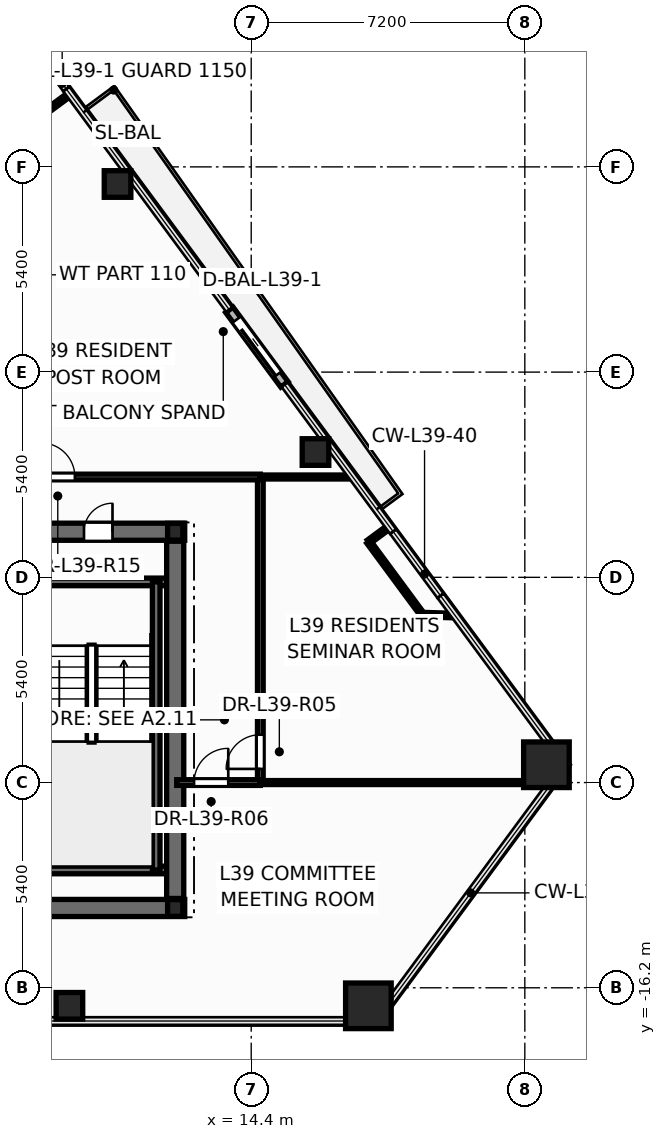
"""IFC4 building model, lengths in metres.
Left out: names, types, materials, properties, quantities, classifications, styles, units other than length and angle.
Written with IfcOpenShell. Run it as: python <this file> out.ifc"""

import sys

from ifc_helpers import new_model, si_unit, direction, frame, frame_2d, origin, origin_2d, place, context, subcontext, project, spatial, rectangle, hollow_rectangle, hollow_circle, i_section, extrude, element, fill, save


model = new_model("IFC4")
c1 = context("Model", 3, precision=1e-05, world=origin(), true_north=direction((0.0, 1.0)))
c2 = subcontext(c1, "Body", "Model", "MODEL_VIEW")
j1 = project(units=[si_unit("LENGTHUNIT", "METRE"), si_unit("PLANEANGLEUNIT", "RADIAN")], contexts=[c1])
p1 = place(None, origin())
s1 = spatial("IfcSite", under=j1, at=p1, CompositionType="ELEMENT")
p2 = place(p1, origin())
s2 = spatial("IfcBuilding", under=s1, at=p2, CompositionType="ELEMENT")
p3 = place(p2, frame((0.0, 0.0, 150.9)))
s3 = spatial("IfcBuildingStorey", under=s2, at=p3, CompositionType="ELEMENT", Elevation=150.9)
for number, where, z_axis, x_axis in (
    (1, (17.484, -16.674, 0.0), (0.0, 0.0, 1.0), (1.0, 0.0, 0.0)),
    (2, (22.168, -10.331, 0.0), (0.0, 0.0, 1.0), (1.0, 0.0, 0.0)),
):
    element("IfcColumn", number, at=place(p3, frame(where, z_axis=z_axis, x_axis=x_axis)), inside=s3, PredefinedType="COLUMN", context=c2, shape_type="SweptSolid", body=[
        extrude(hollow_rectangle(XDim=1.2, YDim=1.2, WallThickness=0.055, at=origin_2d()), origin(), (0.0, 0.0, 1.0), 3.6),
    ])
for number, where, z_axis, x_axis in (
    (3, (9.616, -16.674, 0.0), (0.0, 0.0, 1.0), (1.0, 0.0, 0.0)),
    (4, (16.092, -2.103, 0.0), (0.0, 0.0, 1.0), (1.0, 0.0, 0.0)),
    (5, (10.883, 4.95, 0.0), (0.0, 0.0, 1.0), (1.0, 0.0, 0.0)),
):
    element("IfcColumn", number, at=place(p3, frame(where, z_axis=z_axis, x_axis=x_axis)), inside=s3, PredefinedType="COLUMN", context=c2, shape_type="SweptSolid", body=[
        extrude(hollow_circle(Radius=0.35, WallThickness=0.03, at=origin_2d()), origin(), (0.0, 0.0, 1.0), 3.6),
    ])
for number, where, z_axis, x_axis in (
    (6, (12.4, -14.1, 0.0), (0.0, 0.0, 1.0), (1.0, 0.0, 0.0)),
    (7, (12.4, -4.2, 0.0), (0.0, 0.0, 1.0), (1.0, 0.0, 0.0)),
):
    element("IfcColumn", number, at=place(p3, frame(where, z_axis=z_axis, x_axis=x_axis)), inside=s3, PredefinedType="COLUMN", context=c2, shape_type="SweptSolid", body=[
        extrude(i_section(OverallWidth=0.4, OverallDepth=0.44, WebThickness=0.028, FlangeThickness=0.04, at=origin_2d()), origin(), (0.0, 0.0, 1.0), 3.6),
    ])
p4 = place(p3, frame((15.275, -0.324, -0.015), z_axis=(0.0, 0.0, 1.0), x_axis=(-0.594092829232, 0.804396488216, 0.0)))
e8 = element("IfcWall", 8, at=p4, inside=s3, PredefinedType="STANDARD", context=c2, shape_type="SweptSolid", body=[
    extrude(rectangle(XDim=2.44, YDim=0.24, at=frame_2d((1.22, 0.0))), origin(), (0.0, 0.0, 1.0), 2.807),
])
p5 = place(p4, frame((0.32, 0.0, 0.015)))
e9 = element("IfcOpeningElement", 9, at=p5, cuts=e8, PredefinedType="OPENING", context=c2, shape_type="SweptSolid", body=[
    extrude(rectangle(XDim=1.806, YDim=2.204, at=frame_2d((0.9, 1.102))), frame((0.0, 0.13, 0.0), z_axis=(0.0, -1.0, 0.0), x_axis=(1.0, 0.0, 0.0)), (0.0, 0.0, 1.0), 0.26),
])
p6 = place(p3, frame((-12.65, -14.1, 0.0), z_axis=(0.0, 0.0, 1.0), x_axis=(1.0, 0.0, 0.0)))
e10 = element("IfcWall", 10, at=p6, inside=s3, PredefinedType="SHEAR", context=c2, shape_type="SweptSolid", body=[
    extrude(rectangle(XDim=25.3, YDim=0.45, at=frame_2d((12.65, 0.0))), origin(), (0.0, 0.0, 1.0), 3.6),
])
p7 = place(p3, frame((-12.65, -4.2, 0.0), z_axis=(0.0, 0.0, 1.0), x_axis=(1.0, 0.0, 0.0)))
e11 = element("IfcWall", 11, at=p7, inside=s3, PredefinedType="SHEAR", context=c2, shape_type="SweptSolid", body=[
    extrude(rectangle(XDim=25.3, YDim=0.45, at=frame_2d((12.65, 0.0))), origin(), (0.0, 0.0, 1.0), 3.6),
])
p8 = place(p7, frame((1.85, 0.0, 0.0)))
e12 = element("IfcOpeningElement", 12, at=p8, cuts=e11, PredefinedType="OPENING", context=c2, shape_type="SweptSolid", body=[
    extrude(rectangle(XDim=0.756, YDim=2.054, at=frame_2d((0.375, 1.027))), frame((0.0, 0.235, 0.0), z_axis=(0.0, -1.0, 0.0), x_axis=(1.0, 0.0, 0.0)), (0.0, 0.0, 1.0), 0.47),
])
p9 = place(p7, frame((22.65, 0.0, 0.0)))
e13 = element("IfcOpeningElement", 13, at=p9, cuts=e11, PredefinedType="OPENING", context=c2, shape_type="SweptSolid", body=[
    extrude(rectangle(XDim=0.756, YDim=2.054, at=frame_2d((0.375, 1.027))), frame((0.0, 0.235, 0.0), z_axis=(0.0, -1.0, 0.0), x_axis=(1.0, 0.0, 0.0)), (0.0, 0.0, 1.0), 0.47),
])
p10 = place(p7, frame((5.85, 0.0, 0.0)))
e14 = element("IfcOpeningElement", 14, at=p10, cuts=e11, PredefinedType="OPENING", context=c2, shape_type="SweptSolid", body=[
    extrude(rectangle(XDim=1.006, YDim=2.104, at=frame_2d((0.5, 1.052))), frame((0.0, 0.235, 0.0), z_axis=(0.0, -1.0, 0.0), x_axis=(1.0, 0.0, 0.0)), (0.0, 0.0, 1.0), 0.47),
])
p11 = place(p7, frame((10.35, 0.0, 0.0)))
e15 = element("IfcOpeningElement", 15, at=p11, cuts=e11, PredefinedType="OPENING", context=c2, shape_type="SweptSolid", body=[
    extrude(rectangle(XDim=1.406, YDim=2.154, at=frame_2d((0.7, 1.077))), frame((0.0, 0.235, 0.0), z_axis=(0.0, -1.0, 0.0), x_axis=(1.0, 0.0, 0.0)), (0.0, 0.0, 1.0), 0.47),
])
p12 = place(p7, frame((18.45, 0.0, 0.0)))
e16 = element("IfcOpeningElement", 16, at=p12, cuts=e11, PredefinedType="OPENING", context=c2, shape_type="SweptSolid", body=[
    extrude(rectangle(XDim=1.006, YDim=2.104, at=frame_2d((0.5, 1.052))), frame((0.0, 0.235, 0.0), z_axis=(0.0, -1.0, 0.0), x_axis=(1.0, 0.0, 0.0)), (0.0, 0.0, 1.0), 0.47),
])
for number, where, z_axis, x_axis in (
    (17, (8.48, -5.52, 0.0), (0.0, 0.0, 1.0), (1.0, 0.0, 0.0)),
    (18, (8.48, -13.1, 0.0), (0.0, 0.0, 1.0), (1.0, 0.0, 0.0)),
):
    element("IfcWall", number, at=place(p3, frame(where, z_axis=z_axis, x_axis=x_axis)), inside=s3, PredefinedType="SOLIDWALL", context=c2, shape_type="SweptSolid", body=[
        extrude(rectangle(XDim=3.87, YDim=0.2, at=frame_2d((1.935, 0.0))), origin(), (0.0, 0.0, 1.0), 3.6),
    ])
p13 = place(p3, frame((11.9, -13.1, 0.0), z_axis=(0.0, 0.0, 1.0), x_axis=(0.0, 1.0, 0.0)))
e19 = element("IfcWall", 19, at=p13, inside=s3, PredefinedType="SOLIDWALL", context=c2, shape_type="SweptSolid", body=[
    extrude(rectangle(XDim=7.58, YDim=0.2, at=frame_2d((3.79, 0.0))), origin(), (0.0, 0.0, 1.0), 3.6),
])
p14 = place(p3, frame((12.4, -13.85, 0.0), z_axis=(0.0, 0.0, 1.0), x_axis=(0.0, 1.0, 0.0)))
e20 = element("IfcWall", 20, at=p14, inside=s3, PredefinedType="SHEAR", context=c2, shape_type="SweptSolid", body=[
    extrude(rectangle(XDim=9.4, YDim=0.45, at=frame_2d((4.7, 0.0))), origin(), (0.0, 0.0, 1.0), 3.6),
])
p15 = place(p3, frame((14.64, -10.8, 0.0), z_axis=(0.0, 0.0, 1.0), x_axis=(0.0, 1.0, 0.0)))
e21 = element("IfcWall", 21, at=p15, inside=s3, PredefinedType="PARTITIONING", context=c2, shape_type="SweptSolid", body=[
    extrude(rectangle(XDim=8.04, YDim=0.15, at=frame_2d((4.02, 0.0))), origin(), (0.0, 0.0, 1.0), 2.325),
])
p16 = place(p15, frame((0.359, 0.0, 0.0)))
e22 = element("IfcOpeningElement", 22, at=p16, cuts=e21, PredefinedType="OPENING", context=c2, shape_type="SweptSolid", body=[
    extrude(rectangle(XDim=0.906, YDim=2.104, at=frame_2d((0.45, 1.052))), frame((0.0, 0.085, 0.0), z_axis=(0.0, -1.0, 0.0), x_axis=(1.0, 0.0, 0.0)), (0.0, 0.0, 1.0), 0.17),
])
p17 = place(p3, frame((14.64, -10.8, 0.0), z_axis=(0.0, 0.0, 1.0), x_axis=(1.0, 0.0, 0.0)))
e23 = element("IfcWall", 23, at=p17, inside=s3, PredefinedType="PARTITIONING", context=c2, shape_type="SweptSolid", body=[
    extrude(rectangle(XDim=7.679, YDim=0.105, at=frame_2d((3.84, 0.0))), origin(), (0.0, 0.0, 1.0), 2.792),
])
p18 = place(p3, frame((8.602, -2.76, 0.0), z_axis=(0.0, 0.0, 1.0), x_axis=(1.0, 0.0, 0.0)))
e24 = element("IfcWall", 24, at=p18, inside=s3, PredefinedType="PARTITIONING", context=c2, shape_type="SweptSolid", body=[
    extrude(rectangle(XDim=6.038, YDim=0.15, at=frame_2d((3.019, 0.0))), origin(), (0.0, 0.0, 1.0), 3.35),
])
p19 = place(p18, frame((0.258, 0.0, 0.0)))
e25 = element("IfcOpeningElement", 25, at=p19, cuts=e24, PredefinedType="OPENING", context=c2, shape_type="SweptSolid", body=[
    extrude(rectangle(XDim=0.906, YDim=2.104, at=frame_2d((0.45, 1.052))), frame((0.0, 0.085, 0.0), z_axis=(0.0, -1.0, 0.0), x_axis=(1.0, 0.0, 0.0)), (0.0, 0.0, 1.0), 0.17),
])
p20 = place(p3, frame((14.64, -2.76, 0.0), z_axis=(0.0, 0.0, 1.0), x_axis=(1.0, 0.0, 0.0)))
e26 = element("IfcWall", 26, at=p20, inside=s3, PredefinedType="PARTITIONING", context=c2, shape_type="SweptSolid", body=[
    extrude(rectangle(XDim=2.434, YDim=0.105, at=frame_2d((1.217, 0.0))), origin(), (0.0, 0.0, 1.0), 2.792),
])
p21 = place(p3, frame((12.44, -10.8, 0.0), z_axis=(0.0, 0.0, 1.0), x_axis=(1.0, 0.0, 0.0)))
e27 = element("IfcWall", 27, at=p21, inside=s3, PredefinedType="PARTITIONING", context=c2, shape_type="SweptSolid", body=[
    extrude(rectangle(XDim=2.2, YDim=0.15, at=frame_2d((1.1, 0.0))), origin(), (0.0, 0.0, 1.0), 2.792),
])
p22 = place(p21, frame((0.456, 0.0, 0.0)))
e28 = element("IfcOpeningElement", 28, at=p22, cuts=e27, PredefinedType="OPENING", context=c2, shape_type="SweptSolid", body=[
    extrude(rectangle(XDim=0.906, YDim=2.104, at=frame_2d((0.45, 1.052))), frame((0.0, 0.085, 0.0), z_axis=(0.0, -1.0, 0.0), x_axis=(1.0, 0.0, 0.0)), (0.0, 0.0, 1.0), 0.17),
])
p23 = place(p3, frame((18.903, -6.381, 0.0), z_axis=(0.0, 0.0, 1.0), x_axis=(-0.594053249338, 0.804425718728, 0.0)))
e29 = element("IfcWall", 29, at=p23, inside=s3, PredefinedType="PARTITIONING", context=c2, shape_type="SweptSolid", body=[
    extrude(rectangle(XDim=2.378, YDim=0.12, at=frame_2d((1.189, 0.0))), origin(), (0.0, 0.0, 1.0), 3.35),
])
p24 = place(p3, frame((19.754, -6.406, 0.0), z_axis=(0.0, 0.0, 1.0), x_axis=(-0.999556038353, 0.029794734305, 0.0)))
e30 = element("IfcWall", 30, at=p24, inside=s3, PredefinedType="PARTITIONING", context=c2, shape_type="SweptSolid", body=[
    extrude(rectangle(XDim=0.852, YDim=0.12, at=frame_2d((0.426, 0.0))), origin(), (0.0, 0.0, 1.0), 2.792),
])
for number, where, z_axis, x_axis in (
    (31, (9.623, 7.312, 0.0), (0.0, 0.0, 1.0), (-0.804, -0.594, 0.0)),
    (32, (17.49, -4.468, 0.0), (0.0, 0.0, 1.0), (0.805, 0.594, 0.0)),
):
    element("IfcWall", number, at=place(p3, frame(where, z_axis=z_axis, x_axis=x_axis)), inside=s3, PredefinedType="PARTITIONING", context=c2, shape_type="SweptSolid", body=[
        extrude(rectangle(XDim=0.67, YDim=0.12, at=frame_2d((0.335, 0.0))), origin(), (0.0, 0.0, 1.0), 2.792),
    ])
p25 = place(p5, origin())
e33 = element("IfcDoor", 33, at=p25, inside=s3, OperationType="SLIDING_TO_LEFT", PredefinedType="DOOR", context=c2, shape_type="SweptSolid", body=[
    extrude(rectangle(XDim=1.8, YDim=2.2, at=frame_2d((0.9, 1.1))), frame((0.0, 0.025, 0.0), z_axis=(0.0, -1.0, 0.0), x_axis=(1.0, 0.0, 0.0)), (0.0, 0.0, 1.0), 0.05),
])
fill(e9, e33)
p26 = place(p9, origin())
e34 = element("IfcDoor", 34, at=p26, inside=s3, OperationType="SINGLE_SWING_RIGHT", PredefinedType="DOOR", context=c2, shape_type="SweptSolid", body=[
    extrude(rectangle(XDim=0.75, YDim=2.05, at=frame_2d((0.375, 1.025))), frame((0.0, 0.025, 0.0), z_axis=(0.0, -1.0, 0.0), x_axis=(1.0, 0.0, 0.0)), (0.0, 0.0, 1.0), 0.05),
])
fill(e13, e34)
p27 = place(p16, origin())
e35 = element("IfcDoor", 35, at=p27, inside=s3, OperationType="SINGLE_SWING_LEFT", PredefinedType="DOOR", context=c2, shape_type="SweptSolid", body=[
    extrude(rectangle(XDim=0.9, YDim=2.1, at=frame_2d((0.45, 1.05))), frame((0.0, 0.025, 0.0), z_axis=(0.0, -1.0, 0.0), x_axis=(1.0, 0.0, 0.0)), (0.0, 0.0, 1.0), 0.05),
])
fill(e22, e35)
p28 = place(p22, origin())
e36 = element("IfcDoor", 36, at=p28, inside=s3, OperationType="SINGLE_SWING_RIGHT", PredefinedType="DOOR", context=c2, shape_type="SweptSolid", body=[
    extrude(rectangle(XDim=0.9, YDim=2.1, at=frame_2d((0.45, 1.05))), frame((0.0, 0.025, 0.0), z_axis=(0.0, -1.0, 0.0), x_axis=(1.0, 0.0, 0.0)), (0.0, 0.0, 1.0), 0.05),
])
fill(e28, e36)
p29 = place(p19, origin())
e37 = element("IfcDoor", 37, at=p29, inside=s3, OperationType="SINGLE_SWING_LEFT", PredefinedType="DOOR", context=c2, shape_type="SweptSolid", body=[
    extrude(rectangle(XDim=0.9, YDim=2.1, at=frame_2d((0.45, 1.05))), frame((0.0, 0.025, 0.0), z_axis=(0.0, -1.0, 0.0), x_axis=(1.0, 0.0, 0.0)), (0.0, 0.0, 1.0), 0.05),
])
fill(e25, e37)
save(model, sys.argv[1])
